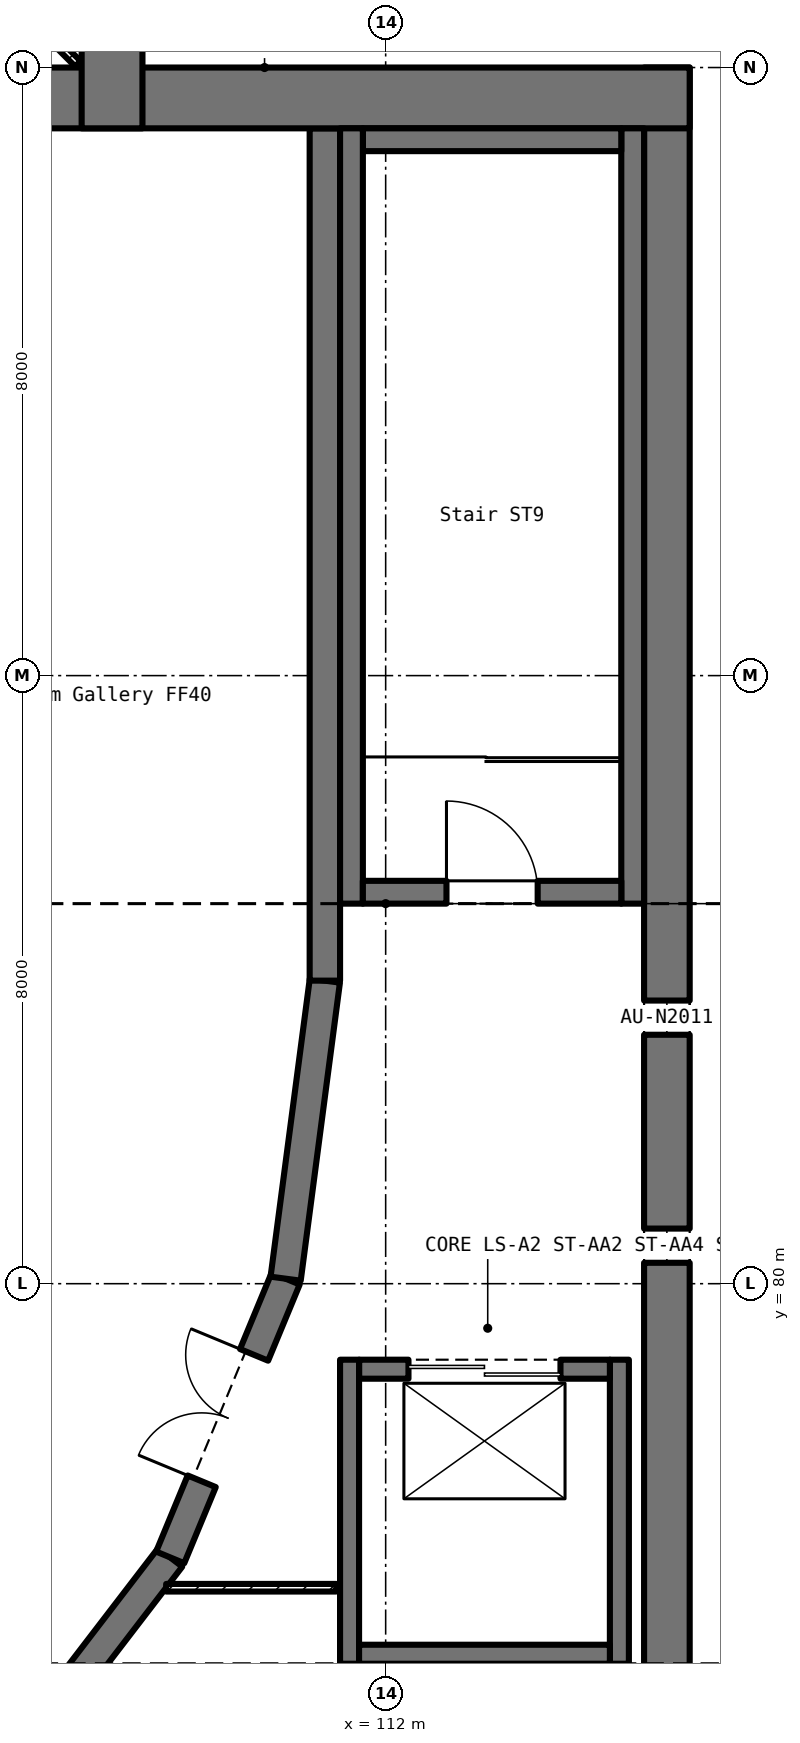
"""IFC4 building model, lengths in metres.
Left out: names, types, materials, properties, quantities, classifications, styles, units other than length and angle.
Written with IfcOpenShell. Run it as: python <this file> out.ifc"""

import sys

from ifc_helpers import new_model, si_unit, direction, frame, frame_2d, origin, place, context, subcontext, project, spatial, polyline, rectangle, outline, extrude, element, fill, save


model = new_model("IFC4")
c1 = context("Model", 3, precision=1e-05, world=origin(), true_north=direction((0.0, 1.0)))
c2 = subcontext(c1, "Body", "Model", "MODEL_VIEW")
j1 = project(units=[si_unit("LENGTHUNIT", "METRE"), si_unit("PLANEANGLEUNIT", "RADIAN")], contexts=[c1])
p1 = place(None, origin())
s1 = spatial("IfcSite", under=j1, at=p1, CompositionType="ELEMENT")
p2 = place(p1, origin())
s2 = spatial("IfcBuilding", under=s1, at=p2, CompositionType="ELEMENT")
p3 = place(p2, frame((0.0, 0.0, 22.5)))
s3 = spatial("IfcBuildingStorey", under=s2, at=p3, CompositionType="ELEMENT", Elevation=22.5)
p4 = place(p3, frame((115.7, 64.0, 0.0), z_axis=(0.0, 0.0, 1.0), x_axis=(0.0, 1.0, 0.0)))
e1 = element("IfcWall", 1, at=p4, inside=s3, PredefinedType="SHEAR", context=c2, shape_type="SweptSolid", body=[
    extrude(rectangle(XDim=32.0, YDim=0.6, at=frame_2d((16.0, 0.0))), origin(), (0.0, 0.0, 1.0), 3.0),
])
p5 = place(p4, frame((16.275, 0.0, 1.0)))
e2 = element("IfcOpeningElement", 2, at=p5, cuts=e1, PredefinedType="OPENING", context=c2, shape_type="SweptSolid", body=[
    extrude(rectangle(XDim=0.45, YDim=1.8, at=frame_2d((0.225, 0.9))), frame((0.0, 0.312, 0.0), z_axis=(0.0, -1.0, 0.0), x_axis=(1.0, 0.0, 0.0)), (0.0, 0.0, 1.0), 0.624),
])
p6 = place(p4, frame((19.275, 0.0, 1.0)))
e3 = element("IfcOpeningElement", 3, at=p6, cuts=e1, PredefinedType="OPENING", context=c2, shape_type="SweptSolid", body=[
    extrude(rectangle(XDim=0.45, YDim=1.8, at=frame_2d((0.225, 0.9))), frame((0.0, 0.312, 0.0), z_axis=(0.0, -1.0, 0.0), x_axis=(1.0, 0.0, 0.0)), (0.0, 0.0, 1.0), 0.624),
])
p7 = place(p3, frame((106.75, 73.25, 0.0), z_axis=(0.0, 0.0, 1.0), x_axis=(0.608568439888, 0.793501388766, 0.0)))
e4 = element("IfcWall", 4, at=p7, inside=s3, PredefinedType="SHEAR", context=c2, shape_type="SweptSolid", body=[
    extrude(rectangle(XDim=3.969, YDim=0.4, at=frame_2d((1.984, 0.0))), origin(), (0.0, 0.0, 1.0), 3.0),
])
p8 = place(p3, frame((109.165, 76.399, 0.0), z_axis=(0.0, 0.0, 1.0), x_axis=(0.38271032831, 0.923868391388, 0.0)))
e5 = element("IfcWall", 5, at=p8, inside=s3, PredefinedType="SHEAR", context=c2, shape_type="SweptSolid", body=[
    extrude(rectangle(XDim=3.969, YDim=0.4, at=frame_2d((1.985, 0.0))), origin(), (0.0, 0.0, 1.0), 3.0),
])
p9 = place(p8, frame((1.084, 0.0, 0.0)))
e6 = element("IfcOpeningElement", 6, at=p9, cuts=e5, PredefinedType="OPENING", context=c2, shape_type="SweptSolid", body=[
    extrude(rectangle(XDim=1.8, YDim=2.1, at=frame_2d((0.9, 1.05))), frame((0.0, 0.212, 0.0), z_axis=(0.0, -1.0, 0.0), x_axis=(1.0, 0.0, 0.0)), (0.0, 0.0, 1.0), 0.424),
])
p10 = place(p3, frame((110.684, 80.066, 0.0), z_axis=(0.0, 0.0, 1.0), x_axis=(0.130436947249, 0.991456606611, 0.0)))
e7 = element("IfcWall", 7, at=p10, inside=s3, PredefinedType="SHEAR", context=c2, shape_type="SweptSolid", body=[
    extrude(rectangle(XDim=3.955, YDim=0.4, at=frame_2d((1.978, 0.0))), origin(), (0.0, 0.0, 1.0), 3.0),
])
p11 = place(p3, frame((111.2, 83.987, 0.0), z_axis=(0.0, 0.0, 1.0), x_axis=(0.0, 1.0, 0.0)))
e8 = element("IfcWall", 8, at=p11, inside=s3, PredefinedType="SHEAR", context=c2, shape_type="SweptSolid", body=[
    extrude(rectangle(XDim=11.213, YDim=0.4, at=frame_2d((5.606, 0.0))), origin(), (0.0, 0.0, 1.0), 3.0),
])
p12 = place(p3, frame((76.0, 95.6, 0.0), z_axis=(0.0, 0.0, 1.0), x_axis=(1.0, 0.0, 0.0)))
e9 = element("IfcWall", 9, at=p12, inside=s3, PredefinedType="SHEAR", context=c2, shape_type="SweptSolid", body=[
    extrude(outline(polyline([(0.0, 0.0), (40.0, 0.0), (40.0, 3.0), (38.08, 3.0), (35.46, 5.5), (35.42, 5.5), (32.8, 5.5), (32.799, 5.5), (29.087, 5.5), (28.0, 5.5), (25.826, 5.5), (22.006, 5.5), (17.994, 5.5), (14.174, 5.5), (12.0, 5.5), (10.913, 5.5), (7.201, 5.5), (7.2, 5.5), (4.58, 5.5), (4.54, 5.5), (1.92, 3.0), (0.0, 3.0), (0.0, 0.0)])), frame((0.0, 0.4, 0.0), z_axis=(0.0, -1.0, 0.0), x_axis=(1.0, 0.0, 0.0)), (0.0, 0.0, 1.0), 0.8),
])
p13 = place(p3, frame((108.4, 95.2, 0.0), z_axis=(0.0, 0.0, 1.0), x_axis=(0.0, 1.0, 0.0)))
e10 = element("IfcWall", 10, at=p13, inside=s3, PredefinedType="SHEAR", context=c2, shape_type="SweptSolid", body=[
    extrude(rectangle(XDim=25.6, YDim=0.8, at=frame_2d((12.8, 0.0))), origin(), (0.0, 0.0, 1.0), 5.5),
])
p14 = place(p13, frame((1.1, 0.0, 2.6)))
e11 = element("IfcOpeningElement", 11, at=p14, cuts=e10, PredefinedType="OPENING", context=c2, shape_type="SweptSolid", body=[
    extrude(rectangle(XDim=2.4, YDim=1.2, at=frame_2d((1.2, 0.6))), frame((0.0, 0.412, 0.0), z_axis=(0.0, -1.0, 0.0), x_axis=(1.0, 0.0, 0.0)), (0.0, 0.0, 1.0), 0.824),
])
p15 = place(p13, frame((4.1, 0.0, 2.6)))
e12 = element("IfcOpeningElement", 12, at=p15, cuts=e10, PredefinedType="OPENING", context=c2, shape_type="SweptSolid", body=[
    extrude(rectangle(XDim=2.4, YDim=1.2, at=frame_2d((1.2, 0.6))), frame((0.0, 0.412, 0.0), z_axis=(0.0, -1.0, 0.0), x_axis=(1.0, 0.0, 0.0)), (0.0, 0.0, 1.0), 0.824),
])
p16 = place(p13, frame((7.1, 0.0, 2.6)))
e13 = element("IfcOpeningElement", 13, at=p16, cuts=e10, PredefinedType="OPENING", context=c2, shape_type="SweptSolid", body=[
    extrude(rectangle(XDim=2.4, YDim=1.2, at=frame_2d((1.2, 0.6))), frame((0.0, 0.412, 0.0), z_axis=(0.0, -1.0, 0.0), x_axis=(1.0, 0.0, 0.0)), (0.0, 0.0, 1.0), 0.824),
])
p17 = place(p13, frame((10.1, 0.0, 2.6)))
e14 = element("IfcOpeningElement", 14, at=p17, cuts=e10, PredefinedType="OPENING", context=c2, shape_type="SweptSolid", body=[
    extrude(rectangle(XDim=2.4, YDim=1.2, at=frame_2d((1.2, 0.6))), frame((0.0, 0.412, 0.0), z_axis=(0.0, -1.0, 0.0), x_axis=(1.0, 0.0, 0.0)), (0.0, 0.0, 1.0), 0.824),
])
p18 = place(p13, frame((13.1, 0.0, 2.6)))
e15 = element("IfcOpeningElement", 15, at=p18, cuts=e10, PredefinedType="OPENING", context=c2, shape_type="SweptSolid", body=[
    extrude(rectangle(XDim=2.4, YDim=1.2, at=frame_2d((1.2, 0.6))), frame((0.0, 0.412, 0.0), z_axis=(0.0, -1.0, 0.0), x_axis=(1.0, 0.0, 0.0)), (0.0, 0.0, 1.0), 0.824),
])
p19 = place(p13, frame((16.1, 0.0, 2.6)))
e16 = element("IfcOpeningElement", 16, at=p19, cuts=e10, PredefinedType="OPENING", context=c2, shape_type="SweptSolid", body=[
    extrude(rectangle(XDim=2.4, YDim=1.2, at=frame_2d((1.2, 0.6))), frame((0.0, 0.412, 0.0), z_axis=(0.0, -1.0, 0.0), x_axis=(1.0, 0.0, 0.0)), (0.0, 0.0, 1.0), 0.824),
])
p20 = place(p13, frame((19.1, 0.0, 2.6)))
e17 = element("IfcOpeningElement", 17, at=p20, cuts=e10, PredefinedType="OPENING", context=c2, shape_type="SweptSolid", body=[
    extrude(rectangle(XDim=2.4, YDim=1.2, at=frame_2d((1.2, 0.6))), frame((0.0, 0.412, 0.0), z_axis=(0.0, -1.0, 0.0), x_axis=(1.0, 0.0, 0.0)), (0.0, 0.0, 1.0), 0.824),
])
p21 = place(p13, frame((22.1, 0.0, 2.6)))
e18 = element("IfcOpeningElement", 18, at=p21, cuts=e10, PredefinedType="OPENING", context=c2, shape_type="SweptSolid", body=[
    extrude(rectangle(XDim=2.4, YDim=1.2, at=frame_2d((1.2, 0.6))), frame((0.0, 0.412, 0.0), z_axis=(0.0, -1.0, 0.0), x_axis=(1.0, 0.0, 0.0)), (0.0, 0.0, 1.0), 0.824),
])
p22 = place(p3, frame((115.25, 85.0, 0.0), z_axis=(0.0, 0.0, 1.0), x_axis=(0.0, 1.0, 0.0)))
e19 = element("IfcWall", 19, at=p22, inside=s3, PredefinedType="SOLIDWALL", context=c2, shape_type="SweptSolid", body=[
    extrude(rectangle(XDim=10.2, YDim=0.3, at=frame_2d((5.1, 0.0))), origin(), (0.0, 0.0, 1.0), 2.9),
])
p23 = place(p3, frame((115.1, 95.05, 0.0), z_axis=(0.0, 0.0, 1.0), x_axis=(-1.0, 0.0, 0.0)))
e20 = element("IfcWall", 20, at=p23, inside=s3, PredefinedType="SOLIDWALL", context=c2, shape_type="SweptSolid", body=[
    extrude(rectangle(XDim=3.4, YDim=0.3, at=frame_2d((1.7, 0.0))), origin(), (0.0, 0.0, 1.0), 2.9),
])
p24 = place(p3, frame((111.55, 95.2, 0.0), z_axis=(0.0, 0.0, 1.0), x_axis=(0.0, -1.0, 0.0)))
e21 = element("IfcWall", 21, at=p24, inside=s3, PredefinedType="SOLIDWALL", context=c2, shape_type="SweptSolid", body=[
    extrude(rectangle(XDim=10.2, YDim=0.3, at=frame_2d((5.1, 0.0))), origin(), (0.0, 0.0, 1.0), 2.9),
])
p25 = place(p3, frame((111.7, 85.15, 0.0), z_axis=(0.0, 0.0, 1.0), x_axis=(1.0, 0.0, 0.0)))
e22 = element("IfcWall", 22, at=p25, inside=s3, PredefinedType="SOLIDWALL", context=c2, shape_type="SweptSolid", body=[
    extrude(rectangle(XDim=3.4, YDim=0.3, at=frame_2d((1.7, 0.0))), origin(), (0.0, 0.0, 1.0), 2.9),
])
p26 = place(p25, frame((1.1, 0.0, 0.0)))
e23 = element("IfcOpeningElement", 23, at=p26, cuts=e22, PredefinedType="OPENING", context=c2, shape_type="SweptSolid", body=[
    extrude(rectangle(XDim=1.2, YDim=2.1, at=frame_2d((0.6, 1.05))), frame((0.0, 0.162, 0.0), z_axis=(0.0, -1.0, 0.0), x_axis=(1.0, 0.0, 0.0)), (0.0, 0.0, 1.0), 0.324),
])
p27 = place(p3, frame((115.075, 75.0, 0.0), z_axis=(0.0, 0.0, 1.0), x_axis=(0.0, 1.0, 0.0)))
e24 = element("IfcWall", 24, at=p27, inside=s3, PredefinedType="SOLIDWALL", context=c2, shape_type="SweptSolid", body=[
    extrude(rectangle(XDim=4.0, YDim=0.25, at=frame_2d((2.0, 0.0))), origin(), (0.0, 0.0, 1.0), 2.9),
])
p28 = place(p3, frame((114.95, 78.875, 0.0), z_axis=(0.0, 0.0, 1.0), x_axis=(-1.0, 0.0, 0.0)))
e25 = element("IfcWall", 25, at=p28, inside=s3, PredefinedType="SOLIDWALL", context=c2, shape_type="SweptSolid", body=[
    extrude(rectangle(XDim=3.3, YDim=0.25, at=frame_2d((1.65, 0.0))), origin(), (0.0, 0.0, 1.0), 2.9),
])
p29 = place(p28, frame((0.65, 0.0, 0.0)))
e26 = element("IfcOpeningElement", 26, at=p29, cuts=e25, PredefinedType="OPENING", context=c2, shape_type="SweptSolid", body=[
    extrude(rectangle(XDim=2.0, YDim=2.2, at=frame_2d((1.0, 1.1))), frame((0.0, 0.137, 0.0), z_axis=(0.0, -1.0, 0.0), x_axis=(1.0, 0.0, 0.0)), (0.0, 0.0, 1.0), 0.274),
])
p30 = place(p3, frame((111.525, 79.0, 0.0), z_axis=(0.0, 0.0, 1.0), x_axis=(0.0, -1.0, 0.0)))
e27 = element("IfcWall", 27, at=p30, inside=s3, PredefinedType="SOLIDWALL", context=c2, shape_type="SweptSolid", body=[
    extrude(rectangle(XDim=4.0, YDim=0.25, at=frame_2d((2.0, 0.0))), origin(), (0.0, 0.0, 1.0), 2.9),
])
p31 = place(p3, frame((111.65, 75.125, 0.0), z_axis=(0.0, 0.0, 1.0), x_axis=(1.0, 0.0, 0.0)))
e28 = element("IfcWall", 28, at=p31, inside=s3, PredefinedType="SOLIDWALL", context=c2, shape_type="SweptSolid", body=[
    extrude(rectangle(XDim=3.3, YDim=0.25, at=frame_2d((1.65, 0.0))), origin(), (0.0, 0.0, 1.0), 2.9),
])
p32 = place(p3, frame((107.95, 96.05, 0.0), z_axis=(0.0, 0.0, 1.0), x_axis=(-0.707106781187, 0.707106781187, 0.0)))
e29 = element("IfcWall", 29, at=p32, inside=s3, PredefinedType="PARTITIONING", context=c2, shape_type="SweptSolid", body=[
    extrude(rectangle(XDim=2.758, YDim=0.1, at=frame_2d((1.379, 0.0))), origin(), (0.0, 0.0, 1.0), 4.6),
])
p33 = place(p3, frame((111.35, 76.0, 0.0), z_axis=(0.0, 0.0, 1.0), x_axis=(-1.0, 0.0, 0.0)))
e30 = element("IfcWall", 30, at=p33, inside=s3, PredefinedType="PARTITIONING", context=c2, shape_type="SweptSolid", body=[
    extrude(rectangle(XDim=2.238, YDim=0.1, at=frame_2d((1.119, 0.0))), origin(), (0.0, 0.0, 1.0), 2.0),
])
p34 = place(p5, origin())
e31 = element("IfcWindow", 31, at=p34, inside=s3, PartitioningType="SINGLE_PANEL", PredefinedType="WINDOW", context=c2, shape_type="SweptSolid", body=[
    extrude(rectangle(XDim=0.45, YDim=1.8, at=frame_2d((0.225, 0.9))), frame((0.0, 0.03, 0.0), z_axis=(0.0, -1.0, 0.0), x_axis=(1.0, 0.0, 0.0)), (0.0, 0.0, 1.0), 0.06),
])
fill(e2, e31)
p35 = place(p6, origin())
e32 = element("IfcWindow", 32, at=p35, inside=s3, PartitioningType="SINGLE_PANEL", PredefinedType="WINDOW", context=c2, shape_type="SweptSolid", body=[
    extrude(rectangle(XDim=0.45, YDim=1.8, at=frame_2d((0.225, 0.9))), frame((0.0, 0.03, 0.0), z_axis=(0.0, -1.0, 0.0), x_axis=(1.0, 0.0, 0.0)), (0.0, 0.0, 1.0), 0.06),
])
fill(e3, e32)
p36 = place(p26, origin())
e33 = element("IfcDoor", 33, at=p36, inside=s3, OperationType="SINGLE_SWING_LEFT", PredefinedType="DOOR", context=c2, shape_type="SweptSolid", body=[
    extrude(rectangle(XDim=1.2, YDim=2.1, at=frame_2d((0.6, 1.05))), frame((0.0, 0.025, 0.0), z_axis=(0.0, -1.0, 0.0), x_axis=(1.0, 0.0, 0.0)), (0.0, 0.0, 1.0), 0.05),
])
fill(e23, e33)
p37 = place(p29, origin())
e34 = element("IfcDoor", 34, at=p37, inside=s3, OperationType="DOUBLE_DOOR_SLIDING", PredefinedType="DOOR", context=c2, shape_type="SweptSolid", body=[
    extrude(rectangle(XDim=2.0, YDim=2.2, at=frame_2d((1.0, 1.1))), frame((0.0, 0.025, 0.0), z_axis=(0.0, -1.0, 0.0), x_axis=(1.0, 0.0, 0.0)), (0.0, 0.0, 1.0), 0.05),
])
fill(e26, e34)
p38 = place(p9, origin())
e35 = element("IfcDoor", 35, at=p38, inside=s3, OperationType="DOUBLE_DOOR_SINGLE_SWING", PredefinedType="DOOR", context=c2, shape_type="SweptSolid", body=[
    extrude(rectangle(XDim=1.8, YDim=2.1, at=frame_2d((0.9, 1.05))), frame((0.0, 0.025, 0.0), z_axis=(0.0, -1.0, 0.0), x_axis=(1.0, 0.0, 0.0)), (0.0, 0.0, 1.0), 0.05),
])
fill(e6, e35)
save(model, sys.argv[1])
